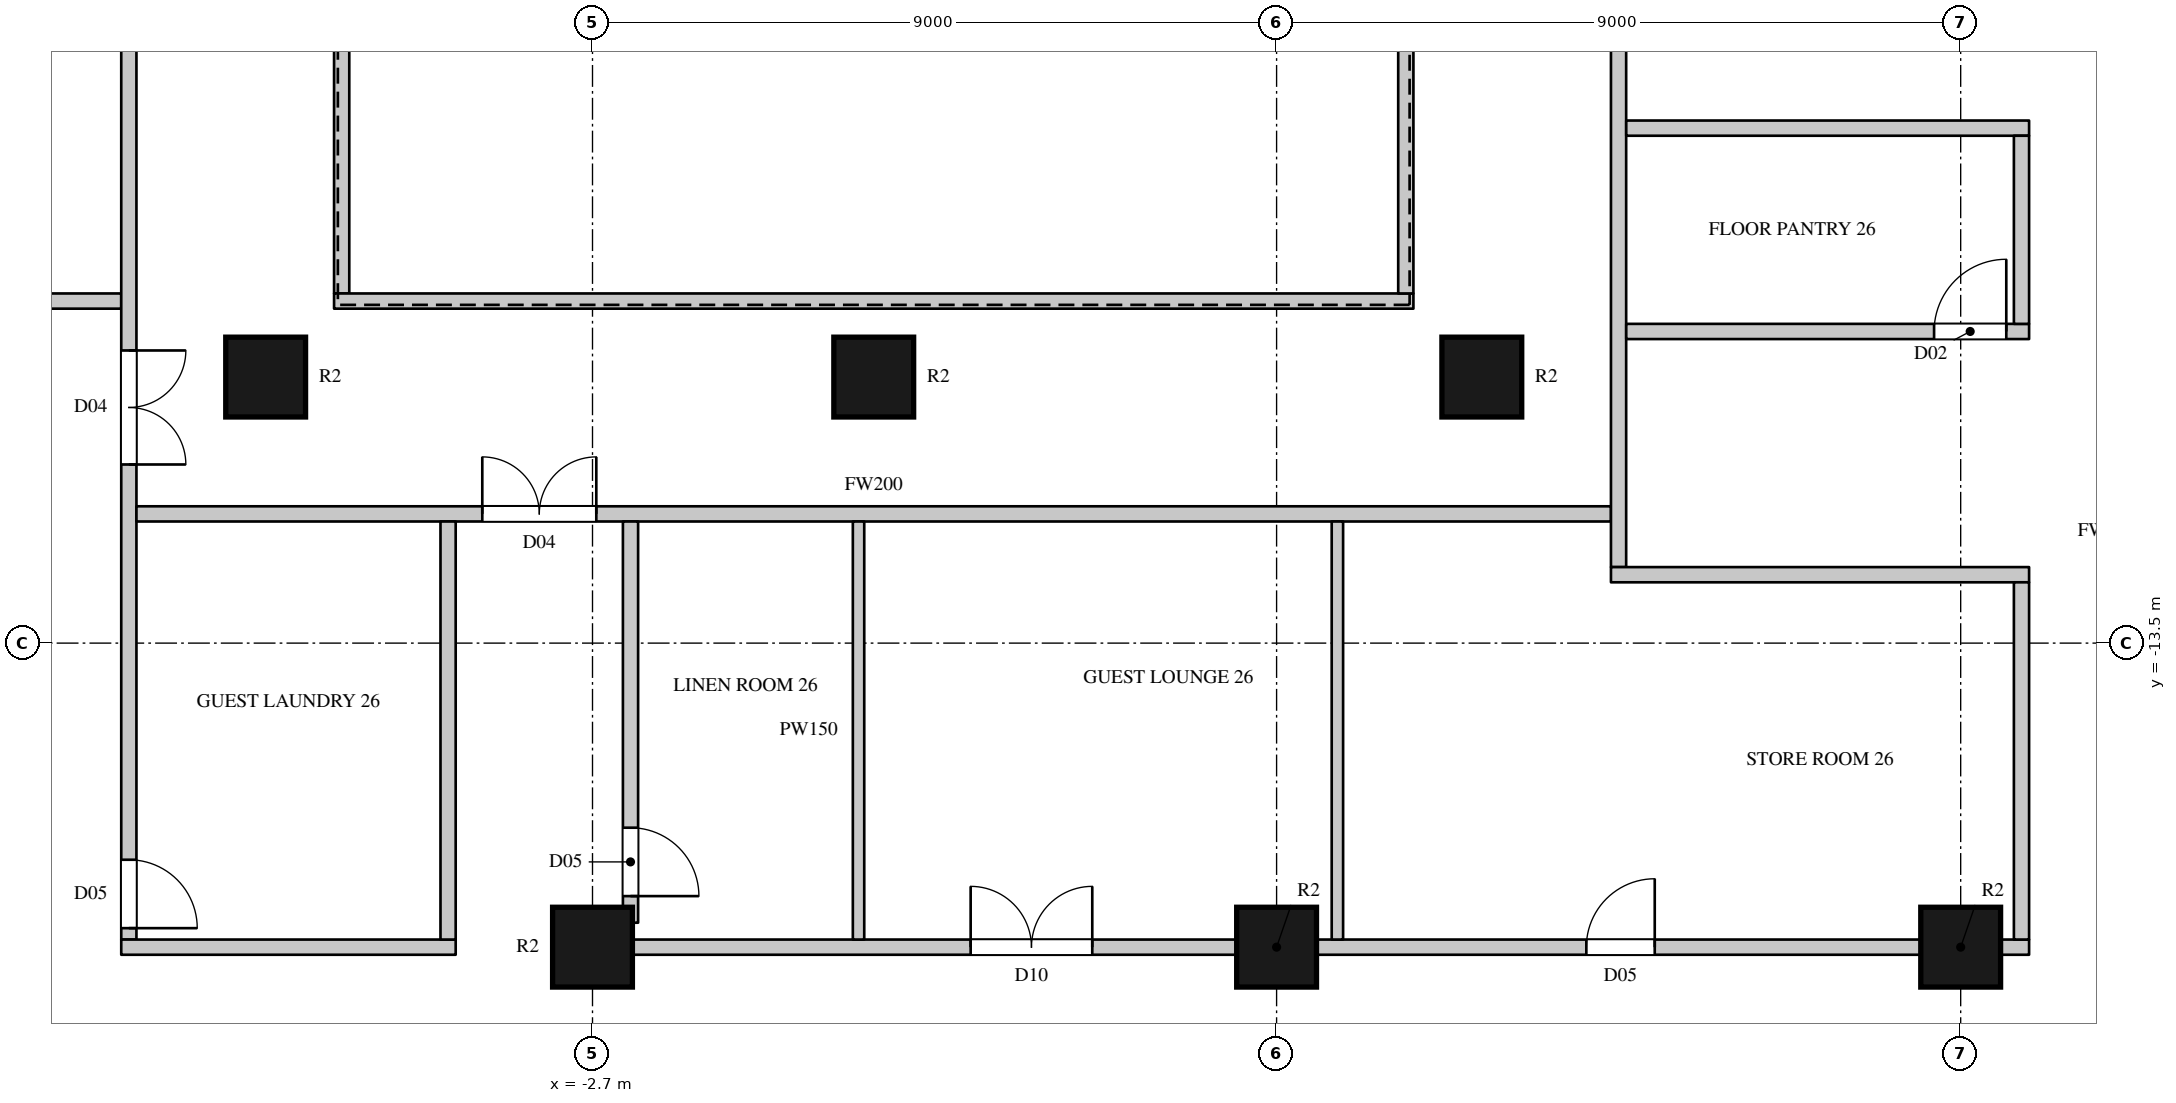
"""IFC4 building model, lengths in metres.
Left out: names, types, materials, properties, quantities, classifications, styles, units other than length and angle.
Written with IfcOpenShell. Run it as: python <this file> out.ifc"""

import sys

from ifc_helpers import new_model, si_unit, direction, frame, frame_2d, origin, origin_2d, place, context, subcontext, project, spatial, rectangle, circle, extrude, element, fill, save


model = new_model("IFC4")
c1 = context("Model", 3, precision=1e-05, world=origin(), true_north=direction((0.0, 1.0)))
c2 = subcontext(c1, "Body", "Model", "MODEL_VIEW")
j1 = project(units=[si_unit("LENGTHUNIT", "METRE"), si_unit("PLANEANGLEUNIT", "RADIAN")], contexts=[c1])
p1 = place(None, origin())
s1 = spatial("IfcSite", under=j1, at=p1, CompositionType="ELEMENT")
p2 = place(p1, origin())
s2 = spatial("IfcBuilding", under=s1, at=p2, CompositionType="ELEMENT")
p3 = place(p2, frame((0.0, 0.0, 123.9)))
s3 = spatial("IfcBuildingStorey", under=s2, at=p3, CompositionType="ELEMENT", Elevation=123.9)
for number, where, z_axis, x_axis in (
    (1, (-2.7, -17.5, 0.0), (0.0, 0.0, 1.0), (1.0, 0.0, 0.0)),
    (2, (6.3, -17.5, 0.0), (0.0, 0.0, 1.0), (1.0, 0.0, 0.0)),
    (3, (15.3, -17.5, 0.0), (0.0, 0.0, 1.0), (1.0, 0.0, 0.0)),
    (4, (-7.0, -10.0, 0.0), (0.0, 0.0, 1.0), (1.0, 0.0, 0.0)),
    (5, (1.0, -10.0, 0.0), (0.0, 0.0, 1.0), (1.0, 0.0, 0.0)),
    (6, (9.0, -10.0, 0.0), (0.0, 0.0, 1.0), (1.0, 0.0, 0.0)),
):
    element("IfcColumn", number, at=place(p3, frame(where, z_axis=z_axis, x_axis=x_axis)), inside=s3, PredefinedType="COLUMN", context=c2, shape_type="SweptSolid", body=[
        extrude(circle(Radius=0.525, at=origin_2d()), origin(), (0.0, 0.0, 1.0), 3.6),
    ])
p4 = place(p3, frame((-13.97, -9.0, 0.0), z_axis=(0.0, 0.0, 1.0), x_axis=(1.0, 0.0, 0.0)))
e7 = element("IfcWall", 7, at=p4, inside=s3, PredefinedType="PARTITIONING", context=c2, shape_type="SweptSolid", body=[
    extrude(rectangle(XDim=5.07, YDim=0.2, at=frame_2d((2.535, 0.0))), origin(), (0.0, 0.0, 1.0), 3.3),
])
p5 = place(p4, frame((0.4, 0.0, 0.0)))
e8 = element("IfcOpeningElement", 8, at=p5, cuts=e7, PredefinedType="OPENING", context=c2, shape_type="SweptSolid", body=[
    extrude(rectangle(XDim=1.5, YDim=2.2, at=frame_2d((0.75, 1.1))), frame((0.0, 0.11, 0.0), z_axis=(0.0, -1.0, 0.0), x_axis=(1.0, 0.0, 0.0)), (0.0, 0.0, 1.0), 0.22),
])
p6 = place(p4, frame((2.05, 0.0, 0.0)))
e9 = element("IfcOpeningElement", 9, at=p6, cuts=e7, PredefinedType="OPENING", context=c2, shape_type="SweptSolid", body=[
    extrude(rectangle(XDim=1.5, YDim=2.2, at=frame_2d((0.75, 1.1))), frame((0.0, 0.11, 0.0), z_axis=(0.0, -1.0, 0.0), x_axis=(1.0, 0.0, 0.0)), (0.0, 0.0, 1.0), 0.22),
])
p7 = place(p3, frame((-8.8, -17.4, 0.0), z_axis=(0.0, 0.0, 1.0), x_axis=(0.0, 1.0, 0.0)))
e10 = element("IfcWall", 10, at=p7, inside=s3, PredefinedType="PARTITIONING", context=c2, shape_type="SweptSolid", body=[
    extrude(rectangle(XDim=29.1, YDim=0.2, at=frame_2d((14.55, 0.0))), origin(), (0.0, 0.0, 1.0), 3.3),
])
p8 = place(p7, frame((21.15, 0.0, 0.0)))
e11 = element("IfcOpeningElement", 11, at=p8, cuts=e10, PredefinedType="OPENING", context=c2, shape_type="SweptSolid", body=[
    extrude(rectangle(XDim=1.5, YDim=2.2, at=frame_2d((0.75, 1.1))), frame((0.0, 0.11, 0.0), z_axis=(0.0, -1.0, 0.0), x_axis=(1.0, 0.0, 0.0)), (0.0, 0.0, 1.0), 0.22),
])
p9 = place(p7, frame((6.25, 0.0, 0.0)))
e12 = element("IfcOpeningElement", 12, at=p9, cuts=e10, PredefinedType="OPENING", context=c2, shape_type="SweptSolid", body=[
    extrude(rectangle(XDim=1.5, YDim=2.2, at=frame_2d((0.75, 1.1))), frame((0.0, 0.11, 0.0), z_axis=(0.0, -1.0, 0.0), x_axis=(1.0, 0.0, 0.0)), (0.0, 0.0, 1.0), 0.22),
])
p10 = place(p7, frame((27.45, 0.0, 0.0)))
e13 = element("IfcOpeningElement", 13, at=p10, cuts=e10, PredefinedType="OPENING", context=c2, shape_type="SweptSolid", body=[
    extrude(rectangle(XDim=1.5, YDim=2.2, at=frame_2d((0.75, 1.1))), frame((0.0, 0.11, 0.0), z_axis=(0.0, -1.0, 0.0), x_axis=(1.0, 0.0, 0.0)), (0.0, 0.0, 1.0), 0.22),
])
p11 = place(p7, frame((0.15, 0.0, 0.0)))
e14 = element("IfcOpeningElement", 14, at=p11, cuts=e10, PredefinedType="OPENING", context=c2, shape_type="SweptSolid", body=[
    extrude(rectangle(XDim=0.9, YDim=2.2, at=frame_2d((0.45, 1.1))), frame((0.0, 0.11, 0.0), z_axis=(0.0, -1.0, 0.0), x_axis=(1.0, 0.0, 0.0)), (0.0, 0.0, 1.0), 0.22),
])
p12 = place(p3, frame((-8.9, -17.5, 0.0), z_axis=(0.0, 0.0, 1.0), x_axis=(1.0, 0.0, 0.0)))
e15 = element("IfcWall", 15, at=p12, inside=s3, PredefinedType="PARTITIONING", context=c2, shape_type="SweptSolid", body=[
    extrude(rectangle(XDim=4.4, YDim=0.2, at=frame_2d((2.2, 0.0))), origin(), (0.0, 0.0, 1.0), 2.75),
])
p13 = place(p3, frame((-8.7, -11.8, 0.0), z_axis=(0.0, 0.0, 1.0), x_axis=(1.0, 0.0, 0.0)))
e16 = element("IfcWall", 16, at=p13, inside=s3, PredefinedType="PARTITIONING", context=c2, shape_type="SweptSolid", body=[
    extrude(rectangle(XDim=19.4, YDim=0.2, at=frame_2d((9.7, 0.0))), origin(), (0.0, 0.0, 1.0), 3.3),
])
p14 = place(p13, frame((4.55, 0.0, 0.0)))
e17 = element("IfcOpeningElement", 17, at=p14, cuts=e16, PredefinedType="OPENING", context=c2, shape_type="SweptSolid", body=[
    extrude(rectangle(XDim=1.5, YDim=2.2, at=frame_2d((0.75, 1.1))), frame((0.0, 0.11, 0.0), z_axis=(0.0, -1.0, 0.0), x_axis=(1.0, 0.0, 0.0)), (0.0, 0.0, 1.0), 0.22),
])
p15 = place(p3, frame((-6.0, -8.9, 0.0), z_axis=(0.0, 0.0, 1.0), x_axis=(0.0, 1.0, 0.0)))
e18 = element("IfcWall", 18, at=p15, inside=s3, PredefinedType="PARTITIONING", context=c2, shape_type="SweptSolid", body=[
    extrude(rectangle(XDim=17.8, YDim=0.2, at=frame_2d((8.9, 0.0))), origin(), (0.0, 0.0, 1.0), 3.3),
])
p16 = place(p3, frame((-6.1, -9.0, 0.0), z_axis=(0.0, 0.0, 1.0), x_axis=(1.0, 0.0, 0.0)))
e19 = element("IfcWall", 19, at=p16, inside=s3, PredefinedType="PARTITIONING", context=c2, shape_type="SweptSolid", body=[
    extrude(rectangle(XDim=14.2, YDim=0.2, at=frame_2d((7.1, 0.0))), origin(), (0.0, 0.0, 1.0), 3.3),
])
p17 = place(p3, frame((-4.6, -17.4, 0.0), z_axis=(0.0, 0.0, 1.0), x_axis=(0.0, 1.0, 0.0)))
e20 = element("IfcWall", 20, at=p17, inside=s3, PredefinedType="PARTITIONING", context=c2, shape_type="SweptSolid", body=[
    extrude(rectangle(XDim=5.5, YDim=0.2, at=frame_2d((2.75, 0.0))), origin(), (0.0, 0.0, 1.0), 3.3),
])
p18 = place(p3, frame((-2.2, -17.178, 0.0), z_axis=(0.0, 0.0, 1.0), x_axis=(0.0, 1.0, 0.0)))
e21 = element("IfcWall", 21, at=p18, inside=s3, PredefinedType="PARTITIONING", context=c2, shape_type="SweptSolid", body=[
    extrude(rectangle(XDim=5.279, YDim=0.2, at=frame_2d((2.639, 0.0))), origin(), (0.0, 0.0, 1.0), 3.3),
])
p19 = place(p18, frame((0.35, 0.0, 0.0)))
e22 = element("IfcOpeningElement", 22, at=p19, cuts=e21, PredefinedType="OPENING", context=c2, shape_type="SweptSolid", body=[
    extrude(rectangle(XDim=0.9, YDim=2.2, at=frame_2d((0.45, 1.1))), frame((0.0, 0.11, 0.0), z_axis=(0.0, -1.0, 0.0), x_axis=(1.0, 0.0, 0.0)), (0.0, 0.0, 1.0), 0.22),
])
p20 = place(p3, frame((-2.175, -17.5, 0.0), z_axis=(0.0, 0.0, 1.0), x_axis=(1.0, 0.0, 0.0)))
e23 = element("IfcWall", 23, at=p20, inside=s3, PredefinedType="PARTITIONING", context=c2, shape_type="SweptSolid", body=[
    extrude(rectangle(XDim=7.95, YDim=0.2, at=frame_2d((3.975, 0.0))), origin(), (0.0, 0.0, 1.0), 2.75),
])
p21 = place(p20, frame((4.45, 0.0, 0.0)))
e24 = element("IfcOpeningElement", 24, at=p21, cuts=e23, PredefinedType="OPENING", context=c2, shape_type="SweptSolid", body=[
    extrude(rectangle(XDim=1.6, YDim=2.4, at=frame_2d((0.8, 1.2))), frame((0.0, 0.11, 0.0), z_axis=(0.0, -1.0, 0.0), x_axis=(1.0, 0.0, 0.0)), (0.0, 0.0, 1.0), 0.22),
])
p22 = place(p3, frame((6.825, -17.5, 0.0), z_axis=(0.0, 0.0, 1.0), x_axis=(1.0, 0.0, 0.0)))
e25 = element("IfcWall", 25, at=p22, inside=s3, PredefinedType="PARTITIONING", context=c2, shape_type="SweptSolid", body=[
    extrude(rectangle(XDim=7.95, YDim=0.2, at=frame_2d((3.975, 0.0))), origin(), (0.0, 0.0, 1.0), 2.75),
])
p23 = place(p22, frame((3.55, 0.0, 0.0)))
e26 = element("IfcOpeningElement", 26, at=p23, cuts=e25, PredefinedType="OPENING", context=c2, shape_type="SweptSolid", body=[
    extrude(rectangle(XDim=0.9, YDim=2.2, at=frame_2d((0.45, 1.1))), frame((0.0, 0.11, 0.0), z_axis=(0.0, -1.0, 0.0), x_axis=(1.0, 0.0, 0.0)), (0.0, 0.0, 1.0), 0.22),
])
p24 = place(p3, frame((15.825, -17.5, 0.0), z_axis=(0.0, 0.0, 1.0), x_axis=(1.0, 0.0, 0.0)))
e27 = element("IfcWall", 27, at=p24, inside=s3, PredefinedType="PARTITIONING", context=c2, shape_type="SweptSolid", body=[
    extrude(rectangle(XDim=0.375, YDim=0.2, at=frame_2d((0.188, 0.0))), origin(), (0.0, 0.0, 1.0), 3.3),
])
p25 = place(p3, frame((8.0, -8.9, 0.0), z_axis=(0.0, 0.0, 1.0), x_axis=(0.0, 1.0, 0.0)))
e28 = element("IfcWall", 28, at=p25, inside=s3, PredefinedType="PARTITIONING", context=c2, shape_type="SweptSolid", body=[
    extrude(rectangle(XDim=17.8, YDim=0.2, at=frame_2d((8.9, 0.0))), origin(), (0.0, 0.0, 1.0), 3.3),
])
p26 = place(p3, frame((10.799, -12.5, 0.0), z_axis=(0.0, 0.0, 1.0), x_axis=(0.0, 1.0, 0.0)))
e29 = element("IfcWall", 29, at=p26, inside=s3, PredefinedType="PARTITIONING", context=c2, shape_type="SweptSolid", body=[
    extrude(rectangle(XDim=24.2, YDim=0.2, at=frame_2d((12.1, 0.0))), origin(), (0.0, 0.0, 1.0), 3.3),
])
p27 = place(p26, frame((13.15, 0.0, 0.0)))
e30 = element("IfcOpeningElement", 30, at=p27, cuts=e29, PredefinedType="OPENING", context=c2, shape_type="SweptSolid", body=[
    extrude(rectangle(XDim=1.5, YDim=2.2, at=frame_2d((0.75, 1.1))), frame((0.0, 0.11, 0.0), z_axis=(0.0, -1.0, 0.0), x_axis=(1.0, 0.0, 0.0)), (0.0, 0.0, 1.0), 0.22),
])
p28 = place(p3, frame((10.699, -12.6, 0.0), z_axis=(0.0, 0.0, 1.0), x_axis=(1.0, 0.0, 0.0)))
e31 = element("IfcWall", 31, at=p28, inside=s3, PredefinedType="PARTITIONING", context=c2, shape_type="SweptSolid", body=[
    extrude(rectangle(XDim=5.501, YDim=0.2, at=frame_2d((2.75, 0.0))), origin(), (0.0, 0.0, 1.0), 3.3),
])
p29 = place(p3, frame((10.9, -9.4, 0.0), z_axis=(0.0, 0.0, 1.0), x_axis=(1.0, 0.0, 0.0)))
e32 = element("IfcWall", 32, at=p29, inside=s3, PredefinedType="PARTITIONING", context=c2, shape_type="SweptSolid", body=[
    extrude(rectangle(XDim=5.3, YDim=0.2, at=frame_2d((2.65, 0.0))), origin(), (0.0, 0.0, 1.0), 3.3),
])
p30 = place(p29, frame((4.05, 0.0, 0.0)))
e33 = element("IfcOpeningElement", 33, at=p30, cuts=e32, PredefinedType="OPENING", context=c2, shape_type="SweptSolid", body=[
    extrude(rectangle(XDim=0.95, YDim=2.2, at=frame_2d((0.475, 1.1))), frame((0.0, 0.11, 0.0), z_axis=(0.0, -1.0, 0.0), x_axis=(1.0, 0.0, 0.0)), (0.0, 0.0, 1.0), 0.22),
])
p31 = place(p3, frame((10.9, -6.725, 0.0), z_axis=(0.0, 0.0, 1.0), x_axis=(1.0, 0.0, 0.0)))
e34 = element("IfcWall", 34, at=p31, inside=s3, PredefinedType="PARTITIONING", context=c2, shape_type="SweptSolid", body=[
    extrude(rectangle(XDim=5.3, YDim=0.2, at=frame_2d((2.65, 0.0))), origin(), (0.0, 0.0, 1.0), 3.3),
])
p32 = place(p3, frame((16.1, -17.4, 0.0), z_axis=(0.0, 0.0, 1.0), x_axis=(0.0, 1.0, 0.0)))
e35 = element("IfcWall", 35, at=p32, inside=s3, PredefinedType="PARTITIONING", context=c2, shape_type="SweptSolid", body=[
    extrude(rectangle(XDim=4.7, YDim=0.2, at=frame_2d((2.35, 0.0))), origin(), (0.0, 0.0, 1.0), 3.3),
])
p33 = place(p3, frame((16.1, -9.3, 0.0), z_axis=(0.0, 0.0, 1.0), x_axis=(0.0, 1.0, 0.0)))
e36 = element("IfcWall", 36, at=p33, inside=s3, PredefinedType="PARTITIONING", context=c2, shape_type="SweptSolid", body=[
    extrude(rectangle(XDim=2.475, YDim=0.2, at=frame_2d((1.238, 0.0))), origin(), (0.0, 0.0, 1.0), 3.3),
])
for number, where, z_axis, x_axis in (
    (37, (0.8, -17.4, 0.0), (0.0, 0.0, 1.0), (0.0, 1.0, 0.0)),
    (38, (7.1, -17.4, 0.0), (0.0, 0.0, 1.0), (0.0, 1.0, 0.0)),
):
    element("IfcWall", number, at=place(p3, frame(where, z_axis=z_axis, x_axis=x_axis)), inside=s3, PredefinedType="PARTITIONING", context=c2, shape_type="SweptSolid", body=[
        extrude(rectangle(XDim=5.5, YDim=0.15, at=frame_2d((2.75, 0.0))), origin(), (0.0, 0.0, 1.0), 3.3),
    ])
p34 = place(p9, origin())
e39 = element("IfcDoor", 39, at=p34, inside=s3, OperationType="DOUBLE_DOOR_SINGLE_SWING", PredefinedType="DOOR", context=c2, shape_type="SweptSolid", body=[
    extrude(rectangle(XDim=1.5, YDim=2.2, at=frame_2d((0.75, 1.1))), frame((0.0, 0.025, 0.0), z_axis=(0.0, -1.0, 0.0), x_axis=(1.0, 0.0, 0.0)), (0.0, 0.0, 1.0), 0.05),
])
fill(e12, e39)
p35 = place(p14, origin())
e40 = element("IfcDoor", 40, at=p35, inside=s3, OperationType="DOUBLE_DOOR_SINGLE_SWING", PredefinedType="DOOR", context=c2, shape_type="SweptSolid", body=[
    extrude(rectangle(XDim=1.5, YDim=2.2, at=frame_2d((0.75, 1.1))), frame((0.0, 0.025, 0.0), z_axis=(0.0, -1.0, 0.0), x_axis=(1.0, 0.0, 0.0)), (0.0, 0.0, 1.0), 0.05),
])
fill(e17, e40)
p36 = place(p11, origin())
e41 = element("IfcDoor", 41, at=p36, inside=s3, OperationType="SINGLE_SWING_RIGHT", PredefinedType="DOOR", context=c2, shape_type="SweptSolid", body=[
    extrude(rectangle(XDim=0.9, YDim=2.2, at=frame_2d((0.45, 1.1))), frame((0.0, 0.025, 0.0), z_axis=(0.0, -1.0, 0.0), x_axis=(1.0, 0.0, 0.0)), (0.0, 0.0, 1.0), 0.05),
])
fill(e14, e41)
p37 = place(p19, origin())
e42 = element("IfcDoor", 42, at=p37, inside=s3, OperationType="SINGLE_SWING_RIGHT", PredefinedType="DOOR", context=c2, shape_type="SweptSolid", body=[
    extrude(rectangle(XDim=0.9, YDim=2.2, at=frame_2d((0.45, 1.1))), frame((0.0, 0.025, 0.0), z_axis=(0.0, -1.0, 0.0), x_axis=(1.0, 0.0, 0.0)), (0.0, 0.0, 1.0), 0.05),
])
fill(e22, e42)
p38 = place(p21, origin())
e43 = element("IfcDoor", 43, at=p38, inside=s3, OperationType="DOUBLE_DOOR_SINGLE_SWING", PredefinedType="DOOR", context=c2, shape_type="SweptSolid", body=[
    extrude(rectangle(XDim=1.6, YDim=2.4, at=frame_2d((0.8, 1.2))), frame((0.0, 0.025, 0.0), z_axis=(0.0, -1.0, 0.0), x_axis=(1.0, 0.0, 0.0)), (0.0, 0.0, 1.0), 0.05),
])
fill(e24, e43)
p39 = place(p23, origin())
e44 = element("IfcDoor", 44, at=p39, inside=s3, OperationType="SINGLE_SWING_RIGHT", PredefinedType="DOOR", context=c2, shape_type="SweptSolid", body=[
    extrude(rectangle(XDim=0.9, YDim=2.2, at=frame_2d((0.45, 1.1))), frame((0.0, 0.025, 0.0), z_axis=(0.0, -1.0, 0.0), x_axis=(1.0, 0.0, 0.0)), (0.0, 0.0, 1.0), 0.05),
])
fill(e26, e44)
p40 = place(p30, origin())
e45 = element("IfcDoor", 45, at=p40, inside=s3, OperationType="SINGLE_SWING_RIGHT", PredefinedType="DOOR", context=c2, shape_type="SweptSolid", body=[
    extrude(rectangle(XDim=0.95, YDim=2.2, at=frame_2d((0.475, 1.1))), frame((0.0, 0.025, 0.0), z_axis=(0.0, -1.0, 0.0), x_axis=(1.0, 0.0, 0.0)), (0.0, 0.0, 1.0), 0.05),
])
fill(e33, e45)
save(model, sys.argv[1])
